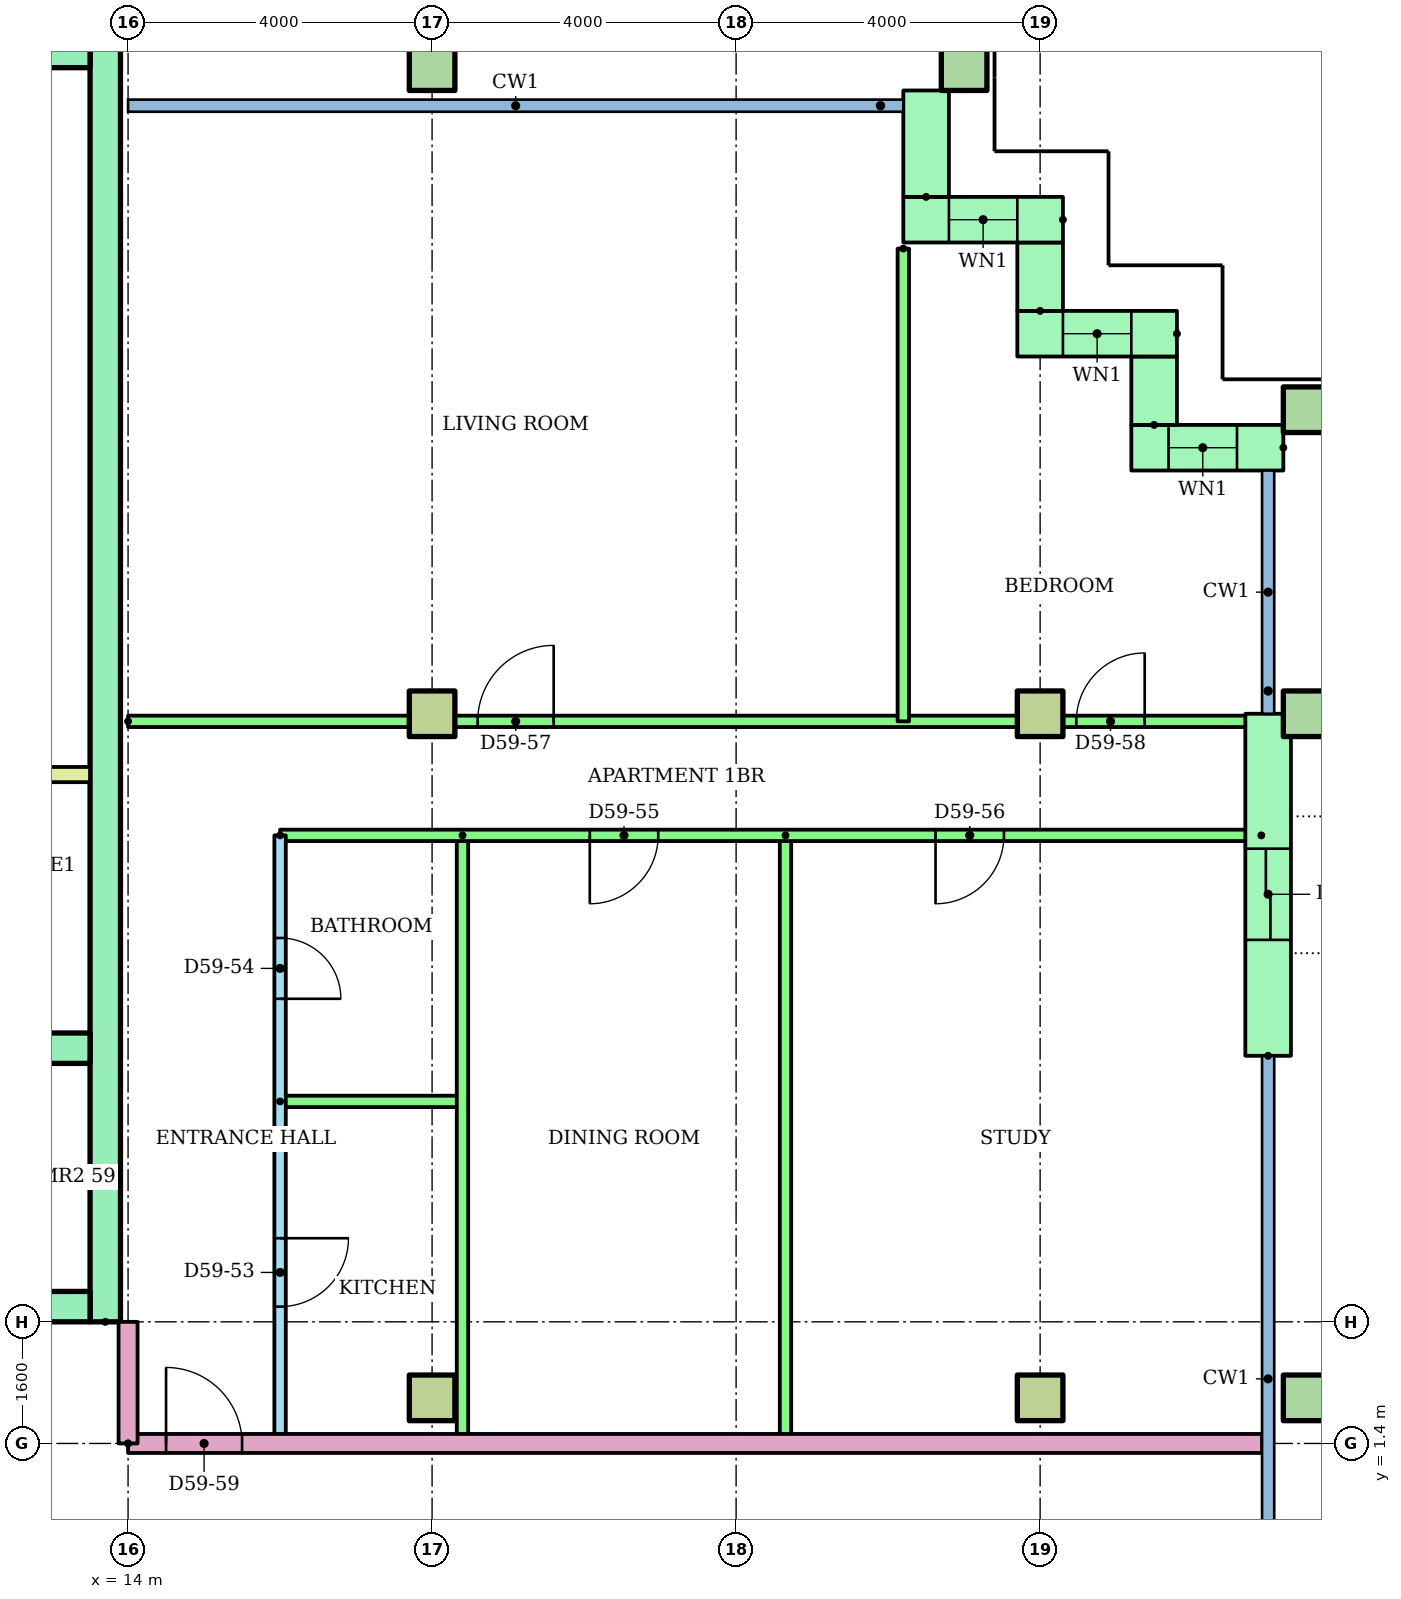
"""IFC4 building model, lengths in metres.
Left out: names, types, materials, properties, quantities, classifications, styles, units other than length and angle.
Written with IfcOpenShell. Run it as: python <this file> out.ifc"""

import sys

from ifc_helpers import new_model, si_unit, direction, frame, frame_2d, origin, origin_2d, place, context, subcontext, project, spatial, rectangle, hollow_rectangle, extrude, element, fill, save


model = new_model("IFC4")
c1 = context("Model", 3, precision=1e-05, world=origin(), true_north=direction((0.0, 1.0)))
c2 = subcontext(c1, "Body", "Model", "MODEL_VIEW")
j1 = project(units=[si_unit("LENGTHUNIT", "METRE"), si_unit("PLANEANGLEUNIT", "RADIAN")], contexts=[c1])
p1 = place(None, origin())
s1 = spatial("IfcSite", under=j1, at=p1, CompositionType="ELEMENT")
p2 = place(p1, origin())
s2 = spatial("IfcBuilding", under=s1, at=p2, CompositionType="ELEMENT")
p3 = place(p2, frame((0.0, 0.0, 226.8)))
s3 = spatial("IfcBuildingStorey", under=s2, at=p3, CompositionType="ELEMENT", Elevation=226.8)
for number, where in (
    (1, (18.0, 2.0, 0.0)),
    (2, (26.0, 2.0, 0.0)),
):
    element("IfcColumn", number, at=place(p3, frame(where)), inside=s3, PredefinedType="COLUMN", context=c2, shape_type="SweptSolid", body=[
        extrude(rectangle(XDim=0.6, YDim=0.6, at=origin_2d()), origin(), (0.0, 0.0, 1.0), 3.2),
    ])
p4 = place(p3, frame((29.5, 2.0, 0.0)))
e3 = element("IfcColumn", 3, at=p4, inside=s3, PredefinedType="COLUMN", context=c2, shape_type="SweptSolid", body=[
    extrude(hollow_rectangle(XDim=0.6, YDim=0.6, WallThickness=0.03, at=origin_2d()), origin(), (0.0, 0.0, 1.0), 3.2),
])
for number, where in (
    (4, (18.0, 11.0, 0.0)),
    (5, (26.0, 11.0, 0.0)),
):
    element("IfcColumn", number, at=place(p3, frame(where)), inside=s3, PredefinedType="COLUMN", context=c2, shape_type="SweptSolid", body=[
        extrude(rectangle(XDim=0.6, YDim=0.6, at=origin_2d()), origin(), (0.0, 0.0, 1.0), 3.2),
    ])
for number, where in (
    (6, (29.5, 11.0, 0.0)),
    (7, (29.5, 15.0, 0.0)),
    (8, (18.0, 19.5, 0.0)),
    (9, (25.0, 19.5, 0.0)),
):
    element("IfcColumn", number, at=place(p3, frame(where)), inside=s3, PredefinedType="COLUMN", context=c2, shape_type="SweptSolid", body=[
        extrude(hollow_rectangle(XDim=0.6, YDim=0.6, WallThickness=0.03, at=origin_2d()), origin(), (0.0, 0.0, 1.0), 3.2),
    ])
p5 = place(p3, frame((29.2, 14.5, 0.0), z_axis=(0.0, 0.0, 1.0), x_axis=(-1.0, 0.0, 0.0)))
e10 = element("IfcWall", 10, at=p5, inside=s3, PredefinedType="STANDARD", context=c2, shape_type="SweptSolid", body=[
    extrude(rectangle(XDim=2.0, YDim=0.6, at=frame_2d((1.0, 0.0))), origin(), (0.0, 0.0, 1.0), 2.92),
])
p6 = place(p5, frame((0.61, 0.0, 0.9)))
e11 = element("IfcOpeningElement", 11, at=p6, cuts=e10, PredefinedType="OPENING", context=c2, shape_type="SweptSolid", body=[
    extrude(rectangle(XDim=0.9, YDim=1.5, at=frame_2d((0.45, 0.75))), frame((0.0, 0.31, 0.0), z_axis=(0.0, -1.0, 0.0), x_axis=(1.0, 0.0, 0.0)), (0.0, 0.0, 1.0), 0.62),
])
p7 = place(p3, frame((27.5, 14.8, 0.0), z_axis=(0.0, 0.0, 1.0), x_axis=(0.0, 1.0, 0.0)))
e12 = element("IfcWall", 12, at=p7, inside=s3, PredefinedType="STANDARD", context=c2, shape_type="SweptSolid", body=[
    extrude(rectangle(XDim=0.9, YDim=0.6, at=frame_2d((0.45, 0.0))), origin(), (0.0, 0.0, 1.0), 2.92),
])
p8 = place(p3, frame((27.8, 16.0, 0.0), z_axis=(0.0, 0.0, 1.0), x_axis=(-1.0, 0.0, 0.0)))
e13 = element("IfcWall", 13, at=p8, inside=s3, PredefinedType="STANDARD", context=c2, shape_type="SweptSolid", body=[
    extrude(rectangle(XDim=2.1, YDim=0.6, at=frame_2d((1.05, 0.0))), origin(), (0.0, 0.0, 1.0), 2.92),
])
p9 = place(p8, frame((0.6, 0.0, 0.9)))
e14 = element("IfcOpeningElement", 14, at=p9, cuts=e13, PredefinedType="OPENING", context=c2, shape_type="SweptSolid", body=[
    extrude(rectangle(XDim=0.9, YDim=1.5, at=frame_2d((0.45, 0.75))), frame((0.0, 0.31, 0.0), z_axis=(0.0, -1.0, 0.0), x_axis=(1.0, 0.0, 0.0)), (0.0, 0.0, 1.0), 0.62),
])
p10 = place(p3, frame((26.0, 16.3, 0.0), z_axis=(0.0, 0.0, 1.0), x_axis=(0.0, 1.0, 0.0)))
e15 = element("IfcWall", 15, at=p10, inside=s3, PredefinedType="STANDARD", context=c2, shape_type="SweptSolid", body=[
    extrude(rectangle(XDim=0.9, YDim=0.6, at=frame_2d((0.45, 0.0))), origin(), (0.0, 0.0, 1.0), 2.92),
])
p11 = place(p3, frame((26.3, 17.5, 0.0), z_axis=(0.0, 0.0, 1.0), x_axis=(-1.0, 0.0, 0.0)))
e16 = element("IfcWall", 16, at=p11, inside=s3, PredefinedType="STANDARD", context=c2, shape_type="SweptSolid", body=[
    extrude(rectangle(XDim=2.1, YDim=0.6, at=frame_2d((1.05, 0.0))), origin(), (0.0, 0.0, 1.0), 2.92),
])
p12 = place(p11, frame((0.6, 0.0, 0.9)))
e17 = element("IfcOpeningElement", 17, at=p12, cuts=e16, PredefinedType="OPENING", context=c2, shape_type="SweptSolid", body=[
    extrude(rectangle(XDim=0.9, YDim=1.5, at=frame_2d((0.45, 0.75))), frame((0.0, 0.31, 0.0), z_axis=(0.0, -1.0, 0.0), x_axis=(1.0, 0.0, 0.0)), (0.0, 0.0, 1.0), 0.62),
])
p13 = place(p3, frame((24.5, 17.8, 0.0), z_axis=(0.0, 0.0, 1.0), x_axis=(0.0, 1.0, 0.0)))
e18 = element("IfcWall", 18, at=p13, inside=s3, PredefinedType="STANDARD", context=c2, shape_type="SweptSolid", body=[
    extrude(rectangle(XDim=1.4, YDim=0.6, at=frame_2d((0.7, 0.0))), origin(), (0.0, 0.0, 1.0), 2.92),
])
p14 = place(p3, frame((29.0, 6.5, 0.0), z_axis=(0.0, 0.0, 1.0), x_axis=(0.0, 1.0, 0.0)))
e19 = element("IfcWall", 19, at=p14, inside=s3, PredefinedType="STANDARD", context=c2, shape_type="SweptSolid", body=[
    extrude(rectangle(XDim=4.5, YDim=0.6, at=frame_2d((2.25, 0.0))), origin(), (0.0, 0.0, 1.0), 2.92),
])
p15 = place(p14, frame((1.525, 0.0, 0.0)))
e20 = element("IfcOpeningElement", 20, at=p15, cuts=e19, PredefinedType="OPENING", context=c2, shape_type="SweptSolid", body=[
    extrude(rectangle(XDim=1.2, YDim=2.1, at=frame_2d((0.6, 1.05))), frame((0.0, 0.31, 0.0), z_axis=(0.0, -1.0, 0.0), x_axis=(1.0, 0.0, 0.0)), (0.0, 0.0, 1.0), 0.62),
])
p16 = place(p3, frame((13.7, 3.0, 0.0), z_axis=(0.0, 0.0, 1.0), x_axis=(0.0, 1.0, 0.0)))
e21 = element("IfcWall", 21, at=p16, inside=s3, PredefinedType="SHEAR", context=c2, shape_type="SweptSolid", body=[
    extrude(rectangle(XDim=17.0, YDim=0.4, at=frame_2d((8.5, 0.0))), origin(), (0.0, 0.0, 1.0), 2.92),
])
p17 = place(p3, frame((-13.5, 19.7, 0.0)))
e22 = element("IfcWall", 22, at=p17, inside=s3, PredefinedType="SHEAR", context=c2, shape_type="SweptSolid", body=[
    extrude(rectangle(XDim=27.0, YDim=0.4, at=frame_2d((13.5, 0.0))), origin(), (0.0, 0.0, 1.0), 2.92),
])
p18 = place(p3, frame((-13.5, 3.2, 0.0)))
e23 = element("IfcWall", 23, at=p18, inside=s3, PredefinedType="SHEAR", context=c2, shape_type="SweptSolid", body=[
    extrude(rectangle(XDim=27.0, YDim=0.4, at=frame_2d((13.5, 0.0))), origin(), (0.0, 0.0, 1.0), 2.92),
])
p19 = place(p18, frame((22.083, 0.0, 0.0)))
e24 = element("IfcOpeningElement", 24, at=p19, cuts=e23, PredefinedType="OPENING", context=c2, shape_type="SweptSolid", body=[
    extrude(rectangle(XDim=1.1, YDim=2.1, at=frame_2d((0.55, 1.05))), frame((0.0, 0.21, 0.0), z_axis=(0.0, -1.0, 0.0), x_axis=(1.0, 0.0, 0.0)), (0.0, 0.0, 1.0), 0.42),
])
p20 = place(p18, frame((25.128, 0.0, 0.0)))
e25 = element("IfcOpeningElement", 25, at=p20, cuts=e23, PredefinedType="OPENING", context=c2, shape_type="SweptSolid", body=[
    extrude(rectangle(XDim=1.1, YDim=2.1, at=frame_2d((0.55, 1.05))), frame((0.0, 0.21, 0.0), z_axis=(0.0, -1.0, 0.0), x_axis=(1.0, 0.0, 0.0)), (0.0, 0.0, 1.0), 0.42),
])
p21 = place(p18, frame((12.6, 0.0, 0.0)))
e26 = element("IfcOpeningElement", 26, at=p21, cuts=e23, PredefinedType="OPENING", context=c2, shape_type="SweptSolid", body=[
    extrude(rectangle(XDim=1.8, YDim=2.1, at=frame_2d((0.9, 1.05))), frame((0.0, 0.21, 0.0), z_axis=(0.0, -1.0, 0.0), x_axis=(1.0, 0.0, 0.0)), (0.0, 0.0, 1.0), 0.42),
])
p22 = place(p3, frame((1.522, 6.6, 0.0)))
e27 = element("IfcWall", 27, at=p22, inside=s3, PredefinedType="SHEAR", context=c2, shape_type="SweptSolid", body=[
    extrude(rectangle(XDim=11.978, YDim=0.4, at=frame_2d((5.989, 0.0))), origin(), (0.0, 0.0, 1.0), 2.92),
])
p23 = place(p22, frame((1.022, 0.0, 0.0)))
e28 = element("IfcOpeningElement", 28, at=p23, cuts=e27, PredefinedType="OPENING", context=c2, shape_type="SweptSolid", body=[
    extrude(rectangle(XDim=1.0, YDim=2.1, at=frame_2d((0.5, 1.05))), frame((0.0, 0.21, 0.0), z_axis=(0.0, -1.0, 0.0), x_axis=(1.0, 0.0, 0.0)), (0.0, 0.0, 1.0), 0.42),
])
p24 = place(p22, frame((4.067, 0.0, 0.0)))
e29 = element("IfcOpeningElement", 29, at=p24, cuts=e27, PredefinedType="OPENING", context=c2, shape_type="SweptSolid", body=[
    extrude(rectangle(XDim=1.0, YDim=2.1, at=frame_2d((0.5, 1.05))), frame((0.0, 0.21, 0.0), z_axis=(0.0, -1.0, 0.0), x_axis=(1.0, 0.0, 0.0)), (0.0, 0.0, 1.0), 0.42),
])
p25 = place(p3, frame((9.6, 10.2, 0.0)))
e30 = element("IfcWall", 30, at=p25, inside=s3, PredefinedType="PARTITIONING", context=c2, shape_type="SweptSolid", body=[
    extrude(rectangle(XDim=3.9, YDim=0.2, at=frame_2d((1.95, 0.0))), origin(), (0.0, 0.0, 1.0), 2.92),
])
p26 = place(p3, frame((16.0, 9.4, 0.0), z_axis=(0.0, 0.0, 1.0), x_axis=(0.0, -1.0, 0.0)))
e31 = element("IfcWall", 31, at=p26, inside=s3, PredefinedType="PARTITIONING", context=c2, shape_type="SweptSolid", body=[
    extrude(rectangle(XDim=8.0, YDim=0.15, at=frame_2d((4.0, 0.0))), origin(), (0.0, 0.0, 1.0), 2.4),
])
p27 = place(p26, frame((5.3, 0.0, 0.0)))
e32 = element("IfcOpeningElement", 32, at=p27, cuts=e31, PredefinedType="OPENING", context=c2, shape_type="SweptSolid", body=[
    extrude(rectangle(XDim=0.9, YDim=2.1, at=frame_2d((0.45, 1.05))), frame((0.0, 0.085, 0.0), z_axis=(0.0, -1.0, 0.0), x_axis=(1.0, 0.0, 0.0)), (0.0, 0.0, 1.0), 0.17),
])
p28 = place(p26, frame((1.35, 0.0, 0.0)))
e33 = element("IfcOpeningElement", 33, at=p28, cuts=e31, PredefinedType="OPENING", context=c2, shape_type="SweptSolid", body=[
    extrude(rectangle(XDim=0.8, YDim=2.1, at=frame_2d((0.4, 1.05))), frame((0.0, 0.085, 0.0), z_axis=(0.0, -1.0, 0.0), x_axis=(1.0, 0.0, 0.0)), (0.0, 0.0, 1.0), 0.17),
])
p29 = place(p3, frame((16.0, 5.9, 0.0)))
e34 = element("IfcWall", 34, at=p29, inside=s3, PredefinedType="PARTITIONING", context=c2, shape_type="SweptSolid", body=[
    extrude(rectangle(XDim=2.4, YDim=0.15, at=frame_2d((1.2, 0.0))), origin(), (0.0, 0.0, 1.0), 2.4),
])
for number, where, z_axis, x_axis in (
    (35, (18.4, 9.4, 0.0), (0.0, 0.0, 1.0), (0.0, -1.0, 0.0)),
    (36, (22.65, 9.4, 0.0), (0.0, 0.0, 1.0), (0.0, -1.0, 0.0)),
):
    element("IfcWall", number, at=place(p3, frame(where, z_axis=z_axis, x_axis=x_axis)), inside=s3, PredefinedType="PARTITIONING", context=c2, shape_type="SweptSolid", body=[
        extrude(rectangle(XDim=8.0, YDim=0.15, at=frame_2d((4.0, 0.0))), origin(), (0.0, 0.0, 1.0), 2.4),
    ])
p30 = place(p3, frame((28.91, 9.4, 0.0), z_axis=(0.0, 0.0, 1.0), x_axis=(-1.0, 0.0, 0.0)))
e37 = element("IfcWall", 37, at=p30, inside=s3, PredefinedType="PARTITIONING", context=c2, shape_type="SweptSolid", body=[
    extrude(rectangle(XDim=12.91, YDim=0.15, at=frame_2d((6.455, 0.0))), origin(), (0.0, 0.0, 1.0), 2.4),
])
p31 = place(p30, frame((7.935, 0.0, 0.0)))
e38 = element("IfcOpeningElement", 38, at=p31, cuts=e37, PredefinedType="OPENING", context=c2, shape_type="SweptSolid", body=[
    extrude(rectangle(XDim=0.9, YDim=2.1, at=frame_2d((0.45, 1.05))), frame((0.0, 0.085, 0.0), z_axis=(0.0, -1.0, 0.0), x_axis=(1.0, 0.0, 0.0)), (0.0, 0.0, 1.0), 0.17),
])
p32 = place(p30, frame((3.386, 0.0, 0.0)))
e39 = element("IfcOpeningElement", 39, at=p32, cuts=e37, PredefinedType="OPENING", context=c2, shape_type="SweptSolid", body=[
    extrude(rectangle(XDim=0.9, YDim=2.1, at=frame_2d((0.45, 1.05))), frame((0.0, 0.085, 0.0), z_axis=(0.0, -1.0, 0.0), x_axis=(1.0, 0.0, 0.0)), (0.0, 0.0, 1.0), 0.17),
])
p33 = place(p3, frame((14.0, 10.9, 0.0)))
e40 = element("IfcWall", 40, at=p33, inside=s3, PredefinedType="PARTITIONING", context=c2, shape_type="SweptSolid", body=[
    extrude(rectangle(XDim=14.91, YDim=0.15, at=frame_2d((7.455, 0.0))), origin(), (0.0, 0.0, 1.0), 2.4),
])
p34 = place(p33, frame((4.6, 0.0, 0.0)))
e41 = element("IfcOpeningElement", 41, at=p34, cuts=e40, PredefinedType="OPENING", context=c2, shape_type="SweptSolid", body=[
    extrude(rectangle(XDim=1.0, YDim=2.1, at=frame_2d((0.5, 1.05))), frame((0.0, 0.085, 0.0), z_axis=(0.0, -1.0, 0.0), x_axis=(1.0, 0.0, 0.0)), (0.0, 0.0, 1.0), 0.17),
])
p35 = place(p33, frame((12.476, 0.0, 0.0)))
e42 = element("IfcOpeningElement", 42, at=p35, cuts=e40, PredefinedType="OPENING", context=c2, shape_type="SweptSolid", body=[
    extrude(rectangle(XDim=0.9, YDim=2.1, at=frame_2d((0.45, 1.05))), frame((0.0, 0.085, 0.0), z_axis=(0.0, -1.0, 0.0), x_axis=(1.0, 0.0, 0.0)), (0.0, 0.0, 1.0), 0.17),
])
p36 = place(p3, frame((24.2, 17.12, 0.0), z_axis=(0.0, 0.0, 1.0), x_axis=(0.0, -1.0, 0.0)))
e43 = element("IfcWall", 43, at=p36, inside=s3, PredefinedType="PARTITIONING", context=c2, shape_type="SweptSolid", body=[
    extrude(rectangle(XDim=6.22, YDim=0.15, at=frame_2d((3.11, 0.0))), origin(), (0.0, 0.0, 1.0), 2.4),
])
p37 = place(p3, frame((14.0, 1.4, 0.0)))
e44 = element("IfcWall", 44, at=p37, inside=s3, PredefinedType="PARTITIONING", context=c2, shape_type="SweptSolid", body=[
    extrude(rectangle(XDim=14.92, YDim=0.25, at=frame_2d((7.46, 0.0))), origin(), (0.0, 0.0, 1.0), 2.4),
])
p38 = place(p37, frame((0.5, 0.0, 0.0)))
e45 = element("IfcOpeningElement", 45, at=p38, cuts=e44, PredefinedType="OPENING", context=c2, shape_type="SweptSolid", body=[
    extrude(rectangle(XDim=1.0, YDim=2.1, at=frame_2d((0.5, 1.05))), frame((0.0, 0.135, 0.0), z_axis=(0.0, -1.0, 0.0), x_axis=(1.0, 0.0, 0.0)), (0.0, 0.0, 1.0), 0.27),
])
p39 = place(p3, frame((14.0, 1.4, 0.0), z_axis=(0.0, 0.0, 1.0), x_axis=(0.0, 1.0, 0.0)))
e46 = element("IfcWall", 46, at=p39, inside=s3, PredefinedType="PARTITIONING", context=c2, shape_type="SweptSolid", body=[
    extrude(rectangle(XDim=1.6, YDim=0.25, at=frame_2d((0.8, 0.0))), origin(), (0.0, 0.0, 1.0), 2.4),
])
p40 = place(p6, origin())
e47 = element("IfcWindow", 47, at=p40, inside=s3, PartitioningType="SINGLE_PANEL", PredefinedType="WINDOW", context=c2, shape_type="SweptSolid", body=[
    extrude(rectangle(XDim=0.9, YDim=1.5, at=frame_2d((0.45, 0.75))), frame((0.0, 0.03, 0.0), z_axis=(0.0, -1.0, 0.0), x_axis=(1.0, 0.0, 0.0)), (0.0, 0.0, 1.0), 0.06),
])
fill(e11, e47)
p41 = place(p9, origin())
e48 = element("IfcWindow", 48, at=p41, inside=s3, PartitioningType="SINGLE_PANEL", PredefinedType="WINDOW", context=c2, shape_type="SweptSolid", body=[
    extrude(rectangle(XDim=0.9, YDim=1.5, at=frame_2d((0.45, 0.75))), frame((0.0, 0.03, 0.0), z_axis=(0.0, -1.0, 0.0), x_axis=(1.0, 0.0, 0.0)), (0.0, 0.0, 1.0), 0.06),
])
fill(e14, e48)
p42 = place(p12, origin())
e49 = element("IfcWindow", 49, at=p42, inside=s3, PartitioningType="SINGLE_PANEL", PredefinedType="WINDOW", context=c2, shape_type="SweptSolid", body=[
    extrude(rectangle(XDim=0.9, YDim=1.5, at=frame_2d((0.45, 0.75))), frame((0.0, 0.03, 0.0), z_axis=(0.0, -1.0, 0.0), x_axis=(1.0, 0.0, 0.0)), (0.0, 0.0, 1.0), 0.06),
])
fill(e17, e49)
p43 = place(p27, origin())
e50 = element("IfcDoor", 50, at=p43, inside=s3, OperationType="SINGLE_SWING_LEFT", PredefinedType="DOOR", context=c2, shape_type="SweptSolid", body=[
    extrude(rectangle(XDim=0.9, YDim=2.1, at=frame_2d((0.45, 1.05))), frame((0.0, 0.025, 0.0), z_axis=(0.0, -1.0, 0.0), x_axis=(1.0, 0.0, 0.0)), (0.0, 0.0, 1.0), 0.05),
])
fill(e32, e50)
p44 = place(p28, origin())
e51 = element("IfcDoor", 51, at=p44, inside=s3, OperationType="SINGLE_SWING_RIGHT", PredefinedType="DOOR", context=c2, shape_type="SweptSolid", body=[
    extrude(rectangle(XDim=0.8, YDim=2.1, at=frame_2d((0.4, 1.05))), frame((0.0, 0.025, 0.0), z_axis=(0.0, -1.0, 0.0), x_axis=(1.0, 0.0, 0.0)), (0.0, 0.0, 1.0), 0.05),
])
fill(e33, e51)
p45 = place(p31, origin())
e52 = element("IfcDoor", 52, at=p45, inside=s3, OperationType="SINGLE_SWING_RIGHT", PredefinedType="DOOR", context=c2, shape_type="SweptSolid", body=[
    extrude(rectangle(XDim=0.9, YDim=2.1, at=frame_2d((0.45, 1.05))), frame((0.0, 0.025, 0.0), z_axis=(0.0, -1.0, 0.0), x_axis=(1.0, 0.0, 0.0)), (0.0, 0.0, 1.0), 0.05),
])
fill(e38, e52)
p46 = place(p32, origin())
e53 = element("IfcDoor", 53, at=p46, inside=s3, OperationType="SINGLE_SWING_RIGHT", PredefinedType="DOOR", context=c2, shape_type="SweptSolid", body=[
    extrude(rectangle(XDim=0.9, YDim=2.1, at=frame_2d((0.45, 1.05))), frame((0.0, 0.025, 0.0), z_axis=(0.0, -1.0, 0.0), x_axis=(1.0, 0.0, 0.0)), (0.0, 0.0, 1.0), 0.05),
])
fill(e39, e53)
p47 = place(p34, origin())
e54 = element("IfcDoor", 54, at=p47, inside=s3, OperationType="SINGLE_SWING_RIGHT", PredefinedType="DOOR", context=c2, shape_type="SweptSolid", body=[
    extrude(rectangle(XDim=1.0, YDim=2.1, at=frame_2d((0.5, 1.05))), frame((0.0, 0.025, 0.0), z_axis=(0.0, -1.0, 0.0), x_axis=(1.0, 0.0, 0.0)), (0.0, 0.0, 1.0), 0.05),
])
fill(e41, e54)
p48 = place(p35, origin())
e55 = element("IfcDoor", 55, at=p48, inside=s3, OperationType="SINGLE_SWING_RIGHT", PredefinedType="DOOR", context=c2, shape_type="SweptSolid", body=[
    extrude(rectangle(XDim=0.9, YDim=2.1, at=frame_2d((0.45, 1.05))), frame((0.0, 0.025, 0.0), z_axis=(0.0, -1.0, 0.0), x_axis=(1.0, 0.0, 0.0)), (0.0, 0.0, 1.0), 0.05),
])
fill(e42, e55)
p49 = place(p38, origin())
e56 = element("IfcDoor", 56, at=p49, inside=s3, OperationType="SINGLE_SWING_LEFT", PredefinedType="DOOR", context=c2, shape_type="SweptSolid", body=[
    extrude(rectangle(XDim=1.0, YDim=2.1, at=frame_2d((0.5, 1.05))), frame((0.0, 0.025, 0.0), z_axis=(0.0, -1.0, 0.0), x_axis=(1.0, 0.0, 0.0)), (0.0, 0.0, 1.0), 0.05),
])
fill(e45, e56)
p50 = place(p15, origin())
e57 = element("IfcDoor", 57, at=p50, inside=s3, OperationType="SLIDING_TO_LEFT", PredefinedType="DOOR", context=c2, shape_type="SweptSolid", body=[
    extrude(rectangle(XDim=1.2, YDim=2.1, at=frame_2d((0.6, 1.05))), frame((0.0, 0.025, 0.0), z_axis=(0.0, -1.0, 0.0), x_axis=(1.0, 0.0, 0.0)), (0.0, 0.0, 1.0), 0.05),
])
fill(e20, e57)
save(model, sys.argv[1])
